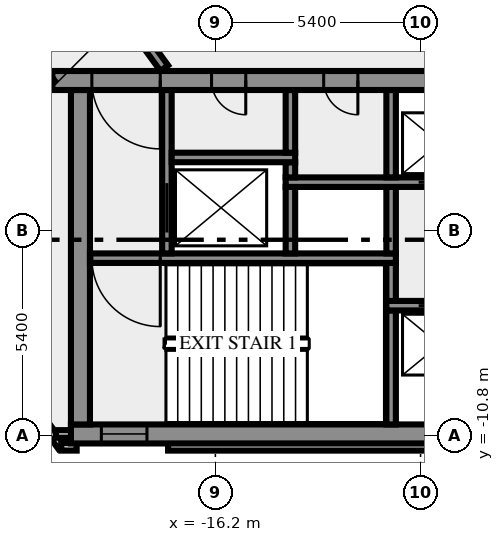
"""IFC4 building model, lengths in metres.
Left out: names, types, materials, properties, quantities, classifications, styles, units other than length and angle.
Written with IfcOpenShell. Run it as: python <this file> out.ifc"""

import sys

from ifc_helpers import new_model, si_unit, direction, frame, frame_2d, origin, place, context, subcontext, project, spatial, rectangle, extrude, element, fill, save


model = new_model("IFC4")
c1 = context("Model", 3, precision=1e-05, world=origin(), true_north=direction((0.0, 1.0)))
c2 = subcontext(c1, "Body", "Model", "MODEL_VIEW")
j1 = project(units=[si_unit("LENGTHUNIT", "METRE"), si_unit("PLANEANGLEUNIT", "RADIAN")], contexts=[c1])
p1 = place(None, origin())
s1 = spatial("IfcSite", under=j1, at=p1, CompositionType="ELEMENT")
p2 = place(p1, origin())
s2 = spatial("IfcBuilding", under=s1, at=p2, CompositionType="ELEMENT")
p3 = place(p2, frame((0.0, 0.0, 43.0)))
s3 = spatial("IfcBuildingStorey", under=s2, at=p3, CompositionType="ELEMENT", Elevation=43.0)
p4 = place(p3, frame((-21.833, -8.909, 0.0), z_axis=(0.0, 0.0, 1.0), x_axis=(0.587766567315, -0.809030569476, 0.0)))
e1 = element("IfcWall", 1, at=p4, inside=s3, PredefinedType="SOLIDWALL", context=c2, shape_type="SweptSolid", body=[
    extrude(rectangle(XDim=2.688, YDim=0.2, at=frame_2d((1.344, 0.0))), origin(), (0.0, 0.0, 1.0), 3.65),
])
p5 = place(p3, frame((-20.256, -11.088, 0.0), z_axis=(0.0, 0.0, 1.0), x_axis=(1.0, 0.0, 0.0)))
e2 = element("IfcWall", 2, at=p5, inside=s3, PredefinedType="SOLIDWALL", context=c2, shape_type="SweptSolid", body=[
    extrude(rectangle(XDim=0.406, YDim=0.2, at=frame_2d((0.203, 0.0))), origin(), (0.0, 0.0, 1.0), 3.65),
])
p6 = place(p3, frame((-17.444, -11.088, 0.0), z_axis=(0.0, 0.0, 1.0), x_axis=(1.0, 0.0, 0.0)))
e3 = element("IfcWall", 3, at=p6, inside=s3, PredefinedType="SOLIDWALL", context=c2, shape_type="SweptSolid", body=[
    extrude(rectangle(XDim=34.888, YDim=0.2, at=frame_2d((17.444, 0.0))), origin(), (0.0, 0.0, 1.0), 3.65),
])
p7 = place(p3, frame((-19.98, -10.75, 0.0), z_axis=(0.0, 0.0, 1.0), x_axis=(-1.0, 0.0, 0.0)))
e4 = element("IfcWall", 4, at=p7, inside=s3, PredefinedType="SOLIDWALL", context=c2, shape_type="SweptSolid", body=[
    extrude(rectangle(XDim=0.417, YDim=0.2, at=frame_2d((0.208, 0.0))), origin(), (0.0, 0.0, 1.0), 3.65),
])
p8 = place(p3, frame((-20.0, -10.75, 0.0), z_axis=(0.0, 0.0, 1.0), x_axis=(1.0, 0.0, 0.0)))
e5 = element("IfcWall", 5, at=p8, inside=s3, PredefinedType="SHEAR", context=c2, shape_type="SweptSolid", body=[
    extrude(rectangle(XDim=40.0, YDim=0.5, at=frame_2d((20.0, 0.0))), origin(), (0.0, 0.0, 1.0), 3.65),
])
p9 = place(p8, frame((0.8, 0.0, 1.0)))
e6 = element("IfcOpeningElement", 6, at=p9, cuts=e5, PredefinedType="OPENING", context=c2, shape_type="SweptSolid", body=[
    extrude(rectangle(XDim=1.2, YDim=1.2, at=frame_2d((0.6, 0.6))), frame((0.0, 0.26, 0.0), z_axis=(0.0, -1.0, 0.0), x_axis=(1.0, 0.0, 0.0)), (0.0, 0.0, 1.0), 0.52),
])
p10 = place(p8, frame((38.0, 0.0, 1.0)))
e7 = element("IfcOpeningElement", 7, at=p10, cuts=e5, PredefinedType="OPENING", context=c2, shape_type="SweptSolid", body=[
    extrude(rectangle(XDim=1.2, YDim=1.2, at=frame_2d((0.6, 0.6))), frame((0.0, 0.26, 0.0), z_axis=(0.0, -1.0, 0.0), x_axis=(1.0, 0.0, 0.0)), (0.0, 0.0, 1.0), 0.52),
])
p11 = place(p3, frame((-19.75, -10.5, 0.0), z_axis=(0.0, 0.0, 1.0), x_axis=(0.0, 1.0, 0.0)))
e8 = element("IfcWall", 8, at=p11, inside=s3, PredefinedType="SHEAR", context=c2, shape_type="SweptSolid", body=[
    extrude(rectangle(XDim=8.8, YDim=0.5, at=frame_2d((4.4, 0.0))), origin(), (0.0, 0.0, 1.0), 3.65),
])
p12 = place(p3, frame((-11.575, -10.5, 0.0), z_axis=(0.0, 0.0, 1.0), x_axis=(0.0, 1.0, 0.0)))
e9 = element("IfcWall", 9, at=p12, inside=s3, PredefinedType="SHEAR", context=c2, shape_type="SweptSolid", body=[
    extrude(rectangle(XDim=3.0, YDim=0.25, at=frame_2d((1.5, 0.0))), origin(), (0.0, 0.0, 1.0), 3.65),
])
p13 = place(p3, frame((11.7, -7.375, 0.0), z_axis=(0.0, 0.0, 1.0), x_axis=(-1.0, 0.0, 0.0)))
e10 = element("IfcWall", 10, at=p13, inside=s3, PredefinedType="SHEAR", context=c2, shape_type="SweptSolid", body=[
    extrude(rectangle(XDim=23.4, YDim=0.25, at=frame_2d((11.7, 0.0))), origin(), (0.0, 0.0, 1.0), 3.65),
])
p14 = place(p13, frame((21.45, 0.0, 0.0)))
e11 = element("IfcOpeningElement", 11, at=p14, cuts=e10, PredefinedType="OPENING", context=c2, shape_type="SweptSolid", body=[
    extrude(rectangle(XDim=1.1, YDim=2.1, at=frame_2d((0.55, 1.05))), frame((0.0, 0.135, 0.0), z_axis=(0.0, -1.0, 0.0), x_axis=(1.0, 0.0, 0.0)), (0.0, 0.0, 1.0), 0.27),
])
p15 = place(p13, frame((18.95, 0.0, 0.0)))
e12 = element("IfcOpeningElement", 12, at=p15, cuts=e10, PredefinedType="OPENING", context=c2, shape_type="SweptSolid", body=[
    extrude(rectangle(XDim=1.1, YDim=2.1, at=frame_2d((0.55, 1.05))), frame((0.0, 0.135, 0.0), z_axis=(0.0, -1.0, 0.0), x_axis=(1.0, 0.0, 0.0)), (0.0, 0.0, 1.0), 0.27),
])
p16 = place(p13, frame((16.45, 0.0, 0.0)))
e13 = element("IfcOpeningElement", 13, at=p16, cuts=e10, PredefinedType="OPENING", context=c2, shape_type="SweptSolid", body=[
    extrude(rectangle(XDim=1.1, YDim=2.1, at=frame_2d((0.55, 1.05))), frame((0.0, 0.135, 0.0), z_axis=(0.0, -1.0, 0.0), x_axis=(1.0, 0.0, 0.0)), (0.0, 0.0, 1.0), 0.27),
])
p17 = place(p13, frame((13.875, 0.0, 0.0)))
e14 = element("IfcOpeningElement", 14, at=p17, cuts=e10, PredefinedType="OPENING", context=c2, shape_type="SweptSolid", body=[
    extrude(rectangle(XDim=0.9, YDim=2.1, at=frame_2d((0.45, 1.05))), frame((0.0, 0.135, 0.0), z_axis=(0.0, -1.0, 0.0), x_axis=(1.0, 0.0, 0.0)), (0.0, 0.0, 1.0), 0.27),
])
p18 = place(p13, frame((11.1, 0.0, 0.0)))
e15 = element("IfcOpeningElement", 15, at=p18, cuts=e10, PredefinedType="OPENING", context=c2, shape_type="SweptSolid", body=[
    extrude(rectangle(XDim=0.9, YDim=2.1, at=frame_2d((0.45, 1.05))), frame((0.0, 0.135, 0.0), z_axis=(0.0, -1.0, 0.0), x_axis=(1.0, 0.0, 0.0)), (0.0, 0.0, 1.0), 0.27),
])
p19 = place(p3, frame((-11.575, -7.25, 0.0), z_axis=(0.0, 0.0, 1.0), x_axis=(0.0, 1.0, 0.0)))
e16 = element("IfcWall", 16, at=p19, inside=s3, PredefinedType="SHEAR", context=c2, shape_type="SweptSolid", body=[
    extrude(rectangle(XDim=1.0, YDim=0.25, at=frame_2d((0.5, 0.0))), origin(), (0.0, 0.0, 1.0), 3.65),
])
p20 = place(p3, frame((-11.45, -6.125, 0.0), z_axis=(0.0, 0.0, 1.0), x_axis=(-1.0, 0.0, 0.0)))
e17 = element("IfcWall", 17, at=p20, inside=s3, PredefinedType="SHEAR", context=c2, shape_type="SweptSolid", body=[
    extrude(rectangle(XDim=8.05, YDim=0.25, at=frame_2d((4.025, 0.0))), origin(), (0.0, 0.0, 1.0), 3.65),
])
p21 = place(p20, frame((6.2, 0.0, 0.0)))
e18 = element("IfcOpeningElement", 18, at=p21, cuts=e17, PredefinedType="OPENING", context=c2, shape_type="SweptSolid", body=[
    extrude(rectangle(XDim=1.8, YDim=2.1, at=frame_2d((0.9, 1.05))), frame((0.0, 0.135, 0.0), z_axis=(0.0, -1.0, 0.0), x_axis=(1.0, 0.0, 0.0)), (0.0, 0.0, 1.0), 0.27),
])
p22 = place(p3, frame((-17.475, -6.0, 0.0), z_axis=(0.0, 0.0, 1.0), x_axis=(0.0, 1.0, 0.0)))
e19 = element("IfcWall", 19, at=p22, inside=s3, PredefinedType="SHEAR", context=c2, shape_type="SweptSolid", body=[
    extrude(rectangle(XDim=4.3, YDim=0.25, at=frame_2d((2.15, 0.0))), origin(), (0.0, 0.0, 1.0), 3.65),
])
p23 = place(p22, frame((0.55, 0.0, 0.0)))
e20 = element("IfcOpeningElement", 20, at=p23, cuts=e19, PredefinedType="OPENING", context=c2, shape_type="SweptSolid", body=[
    extrude(rectangle(XDim=1.3, YDim=2.1, at=frame_2d((0.65, 1.05))), frame((0.0, 0.135, 0.0), z_axis=(0.0, -1.0, 0.0), x_axis=(1.0, 0.0, 0.0)), (0.0, 0.0, 1.0), 0.27),
])
for number, where, z_axis, x_axis in (
    (21, (-14.225, -6.0, 0.0), (0.0, 0.0, 1.0), (0.0, 1.0, 0.0)),
    (22, (-11.575, -6.0, 0.0), (0.0, 0.0, 1.0), (0.0, 1.0, 0.0)),
):
    element("IfcWall", number, at=place(p3, frame(where, z_axis=z_axis, x_axis=x_axis)), inside=s3, PredefinedType="SHEAR", context=c2, shape_type="SweptSolid", body=[
        extrude(rectangle(XDim=1.75, YDim=0.25, at=frame_2d((0.875, 0.0))), origin(), (0.0, 0.0, 1.0), 3.65),
    ])
p24 = place(p3, frame((-14.35, -4.125, 0.0), z_axis=(0.0, 0.0, 1.0), x_axis=(1.0, 0.0, 0.0)))
e23 = element("IfcWall", 23, at=p24, inside=s3, PredefinedType="SHEAR", context=c2, shape_type="SweptSolid", body=[
    extrude(rectangle(XDim=12.7, YDim=0.25, at=frame_2d((6.35, 0.0))), origin(), (0.0, 0.0, 1.0), 3.65),
])
p25 = place(p24, frame((3.5, 0.0, 0.0)))
e24 = element("IfcOpeningElement", 24, at=p25, cuts=e23, PredefinedType="OPENING", context=c2, shape_type="SweptSolid", body=[
    extrude(rectangle(XDim=1.1, YDim=2.1, at=frame_2d((0.55, 1.05))), frame((0.0, 0.135, 0.0), z_axis=(0.0, -1.0, 0.0), x_axis=(1.0, 0.0, 0.0)), (0.0, 0.0, 1.0), 0.27),
])
p26 = place(p24, frame((6.0, 0.0, 0.0)))
e25 = element("IfcOpeningElement", 25, at=p26, cuts=e23, PredefinedType="OPENING", context=c2, shape_type="SweptSolid", body=[
    extrude(rectangle(XDim=1.1, YDim=2.1, at=frame_2d((0.55, 1.05))), frame((0.0, 0.135, 0.0), z_axis=(0.0, -1.0, 0.0), x_axis=(1.0, 0.0, 0.0)), (0.0, 0.0, 1.0), 0.27),
])
p27 = place(p24, frame((8.5, 0.0, 0.0)))
e26 = element("IfcOpeningElement", 26, at=p27, cuts=e23, PredefinedType="OPENING", context=c2, shape_type="SweptSolid", body=[
    extrude(rectangle(XDim=1.1, YDim=2.1, at=frame_2d((0.55, 1.05))), frame((0.0, 0.135, 0.0), z_axis=(0.0, -1.0, 0.0), x_axis=(1.0, 0.0, 0.0)), (0.0, 0.0, 1.0), 0.27),
])
p28 = place(p3, frame((-14.225, -4.0, 0.0), z_axis=(0.0, 0.0, 1.0), x_axis=(0.0, 1.0, 0.0)))
e27 = element("IfcWall", 27, at=p28, inside=s3, PredefinedType="SHEAR", context=c2, shape_type="SweptSolid", body=[
    extrude(rectangle(XDim=0.4, YDim=0.25, at=frame_2d((0.2, 0.0))), origin(), (0.0, 0.0, 1.0), 3.65),
])
p29 = place(p3, frame((-11.575, -4.0, 0.0), z_axis=(0.0, 0.0, 1.0), x_axis=(0.0, 1.0, 0.0)))
e28 = element("IfcWall", 28, at=p29, inside=s3, PredefinedType="SHEAR", context=c2, shape_type="SweptSolid", body=[
    extrude(rectangle(XDim=2.3, YDim=0.25, at=frame_2d((1.15, 0.0))), origin(), (0.0, 0.0, 1.0), 3.65),
])
p30 = place(p3, frame((-17.35, -3.475, 0.0), z_axis=(0.0, 0.0, 1.0), x_axis=(1.0, 0.0, 0.0)))
e29 = element("IfcWall", 29, at=p30, inside=s3, PredefinedType="SHEAR", context=c2, shape_type="SweptSolid", body=[
    extrude(rectangle(XDim=3.25, YDim=0.25, at=frame_2d((1.625, 0.0))), origin(), (0.0, 0.0, 1.0), 3.65),
])
p31 = place(p3, frame((-14.225, -3.35, 0.0), z_axis=(0.0, 0.0, 1.0), x_axis=(0.0, 1.0, 0.0)))
e30 = element("IfcWall", 30, at=p31, inside=s3, PredefinedType="SHEAR", context=c2, shape_type="SweptSolid", body=[
    extrude(rectangle(XDim=1.65, YDim=0.25, at=frame_2d((0.825, 0.0))), origin(), (0.0, 0.0, 1.0), 3.65),
])
p32 = place(p3, frame((20.49, -1.45, 0.0), z_axis=(0.0, 0.0, 1.0), x_axis=(-1.0, 0.0, 0.0)))
e31 = element("IfcWall", 31, at=p32, inside=s3, PredefinedType="SHEAR", context=c2, shape_type="SweptSolid", body=[
    extrude(rectangle(XDim=40.98, YDim=0.5, at=frame_2d((20.49, 0.0))), origin(), (0.0, 0.0, 1.0), 3.65),
])
p33 = place(p32, frame((38.14, 0.0, 0.0)))
e32 = element("IfcOpeningElement", 32, at=p33, cuts=e31, PredefinedType="OPENING", context=c2, shape_type="SweptSolid", body=[
    extrude(rectangle(XDim=1.8, YDim=2.1, at=frame_2d((0.9, 1.05))), frame((0.0, 0.26, 0.0), z_axis=(0.0, -1.0, 0.0), x_axis=(1.0, 0.0, 0.0)), (0.0, 0.0, 1.0), 0.52),
])
p34 = place(p32, frame((35.89, 0.0, 0.0)))
e33 = element("IfcOpeningElement", 33, at=p34, cuts=e31, PredefinedType="OPENING", context=c2, shape_type="SweptSolid", body=[
    extrude(rectangle(XDim=0.9, YDim=2.1, at=frame_2d((0.45, 1.05))), frame((0.0, 0.26, 0.0), z_axis=(0.0, -1.0, 0.0), x_axis=(1.0, 0.0, 0.0)), (0.0, 0.0, 1.0), 0.52),
])
p35 = place(p32, frame((32.94, 0.0, 0.0)))
e34 = element("IfcOpeningElement", 34, at=p35, cuts=e31, PredefinedType="OPENING", context=c2, shape_type="SweptSolid", body=[
    extrude(rectangle(XDim=0.9, YDim=2.1, at=frame_2d((0.45, 1.05))), frame((0.0, 0.26, 0.0), z_axis=(0.0, -1.0, 0.0), x_axis=(1.0, 0.0, 0.0)), (0.0, 0.0, 1.0), 0.52),
])
p36 = place(p32, frame((19.59, 0.0, 0.0)))
e35 = element("IfcOpeningElement", 35, at=p36, cuts=e31, PredefinedType="OPENING", context=c2, shape_type="SweptSolid", body=[
    extrude(rectangle(XDim=2.0, YDim=2.1, at=frame_2d((1.0, 1.05))), frame((0.0, 0.26, 0.0), z_axis=(0.0, -1.0, 0.0), x_axis=(1.0, 0.0, 0.0)), (0.0, 0.0, 1.0), 0.52),
])
p37 = place(p32, frame((7.14, 0.0, 0.0)))
e36 = element("IfcOpeningElement", 36, at=p37, cuts=e31, PredefinedType="OPENING", context=c2, shape_type="SweptSolid", body=[
    extrude(rectangle(XDim=0.9, YDim=2.1, at=frame_2d((0.45, 1.05))), frame((0.0, 0.26, 0.0), z_axis=(0.0, -1.0, 0.0), x_axis=(1.0, 0.0, 0.0)), (0.0, 0.0, 1.0), 0.52),
])
p38 = place(p32, frame((5.028, 0.0, 0.0)))
e37 = element("IfcOpeningElement", 37, at=p38, cuts=e31, PredefinedType="OPENING", context=c2, shape_type="SweptSolid", body=[
    extrude(rectangle(XDim=0.8, YDim=2.1, at=frame_2d((0.4, 1.05))), frame((0.0, 0.26, 0.0), z_axis=(0.0, -1.0, 0.0), x_axis=(1.0, 0.0, 0.0)), (0.0, 0.0, 1.0), 0.52),
])
p39 = place(p32, frame((3.452, 0.0, 0.0)))
e38 = element("IfcOpeningElement", 38, at=p39, cuts=e31, PredefinedType="OPENING", context=c2, shape_type="SweptSolid", body=[
    extrude(rectangle(XDim=0.8, YDim=2.1, at=frame_2d((0.4, 1.05))), frame((0.0, 0.26, 0.0), z_axis=(0.0, -1.0, 0.0), x_axis=(1.0, 0.0, 0.0)), (0.0, 0.0, 1.0), 0.52),
])
p40 = place(p32, frame((1.04, 0.0, 0.0)))
e39 = element("IfcOpeningElement", 39, at=p40, cuts=e31, PredefinedType="OPENING", context=c2, shape_type="SweptSolid", body=[
    extrude(rectangle(XDim=1.8, YDim=2.1, at=frame_2d((0.9, 1.05))), frame((0.0, 0.26, 0.0), z_axis=(0.0, -1.0, 0.0), x_axis=(1.0, 0.0, 0.0)), (0.0, 0.0, 1.0), 0.52),
])
p41 = place(p3, frame((-20.531, -1.523, 0.0), z_axis=(0.0, 0.0, 1.0), x_axis=(-0.587784593204, 0.809017473231, 0.0)))
e40 = element("IfcWall", 40, at=p41, inside=s3, PredefinedType="SOLIDWALL", context=c2, shape_type="SweptSolid", body=[
    extrude(rectangle(XDim=44.67, YDim=0.25, at=frame_2d((22.335, 0.0))), origin(), (0.0, 0.0, 1.0), 3.65),
])
p42 = place(p41, frame((26.14, 0.0, 0.0)))
e41 = element("IfcOpeningElement", 41, at=p42, cuts=e40, PredefinedType="OPENING", context=c2, shape_type="SweptSolid", body=[
    extrude(rectangle(XDim=1.8, YDim=2.1, at=frame_2d((0.9, 1.05))), frame((0.0, 0.135, 0.0), z_axis=(0.0, -1.0, 0.0), x_axis=(1.0, 0.0, 0.0)), (0.0, 0.0, 1.0), 0.27),
])
p43 = place(p41, frame((43.296, 0.0, 0.0)))
e42 = element("IfcOpeningElement", 42, at=p43, cuts=e40, PredefinedType="OPENING", context=c2, shape_type="SweptSolid", body=[
    extrude(rectangle(XDim=0.9, YDim=2.1, at=frame_2d((0.45, 1.05))), frame((0.0, 0.135, 0.0), z_axis=(0.0, -1.0, 0.0), x_axis=(1.0, 0.0, 0.0)), (0.0, 0.0, 1.0), 0.27),
])
p44 = place(p41, frame((13.216, 0.0, 0.0)))
e43 = element("IfcOpeningElement", 43, at=p44, cuts=e40, PredefinedType="OPENING", context=c2, shape_type="SweptSolid", body=[
    extrude(rectangle(XDim=0.9, YDim=2.1, at=frame_2d((0.45, 1.05))), frame((0.0, 0.135, 0.0), z_axis=(0.0, -1.0, 0.0), x_axis=(1.0, 0.0, 0.0)), (0.0, 0.0, 1.0), 0.27),
])
p45 = place(p41, frame((7.816, 0.0, 0.0)))
e44 = element("IfcOpeningElement", 44, at=p45, cuts=e40, PredefinedType="OPENING", context=c2, shape_type="SweptSolid", body=[
    extrude(rectangle(XDim=0.9, YDim=2.1, at=frame_2d((0.45, 1.05))), frame((0.0, 0.135, 0.0), z_axis=(0.0, -1.0, 0.0), x_axis=(1.0, 0.0, 0.0)), (0.0, 0.0, 1.0), 0.27),
])
p46 = place(p41, frame((0.533, 0.0, 0.0)))
e45 = element("IfcOpeningElement", 45, at=p46, cuts=e40, PredefinedType="OPENING", context=c2, shape_type="SweptSolid", body=[
    extrude(rectangle(XDim=0.9, YDim=2.1, at=frame_2d((0.45, 1.05))), frame((0.0, 0.135, 0.0), z_axis=(0.0, -1.0, 0.0), x_axis=(1.0, 0.0, 0.0)), (0.0, 0.0, 1.0), 0.27),
])
p47 = place(p3, frame((-37.232, 25.972, 0.0), z_axis=(0.0, 0.0, 1.0), x_axis=(0.587786323093, -0.809016216391, 0.0)))
e46 = element("IfcWall", 46, at=p47, inside=s3, PredefinedType="SOLIDWALL", context=c2, shape_type="SweptSolid", body=[
    extrude(rectangle(XDim=33.493, YDim=0.25, at=frame_2d((16.747, 0.0))), origin(), (0.0, 0.0, 1.0), 3.65),
])
p48 = place(p47, frame((2.935, 0.0, 0.0)))
e47 = element("IfcOpeningElement", 47, at=p48, cuts=e46, PredefinedType="OPENING", context=c2, shape_type="SweptSolid", body=[
    extrude(rectangle(XDim=0.9, YDim=2.1, at=frame_2d((0.45, 1.05))), frame((0.0, 0.135, 0.0), z_axis=(0.0, -1.0, 0.0), x_axis=(1.0, 0.0, 0.0)), (0.0, 0.0, 1.0), 0.27),
])
p49 = place(p47, frame((16.435, 0.0, 0.0)))
e48 = element("IfcOpeningElement", 48, at=p49, cuts=e46, PredefinedType="OPENING", context=c2, shape_type="SweptSolid", body=[
    extrude(rectangle(XDim=0.9, YDim=2.1, at=frame_2d((0.45, 1.05))), frame((0.0, 0.135, 0.0), z_axis=(0.0, -1.0, 0.0), x_axis=(1.0, 0.0, 0.0)), (0.0, 0.0, 1.0), 0.27),
])
p50 = place(p47, frame((29.152, 0.0, 0.0)))
e49 = element("IfcOpeningElement", 49, at=p50, cuts=e46, PredefinedType="OPENING", context=c2, shape_type="SweptSolid", body=[
    extrude(rectangle(XDim=0.9, YDim=2.1, at=frame_2d((0.45, 1.05))), frame((0.0, 0.135, 0.0), z_axis=(0.0, -1.0, 0.0), x_axis=(1.0, 0.0, 0.0)), (0.0, 0.0, 1.0), 0.27),
])
p51 = place(p47, frame((14.536, 0.0, 0.0)))
e50 = element("IfcOpeningElement", 50, at=p51, cuts=e46, PredefinedType="OPENING", context=c2, shape_type="SweptSolid", body=[
    extrude(rectangle(XDim=1.2, YDim=2.1, at=frame_2d((0.6, 1.05))), frame((0.0, 0.135, 0.0), z_axis=(0.0, -1.0, 0.0), x_axis=(1.0, 0.0, 0.0)), (0.0, 0.0, 1.0), 0.27),
])
p52 = place(p47, frame((1.335, 0.0, 0.0)))
e51 = element("IfcOpeningElement", 51, at=p52, cuts=e46, PredefinedType="OPENING", context=c2, shape_type="SweptSolid", body=[
    extrude(rectangle(XDim=0.9, YDim=2.1, at=frame_2d((0.45, 1.05))), frame((0.0, 0.135, 0.0), z_axis=(0.0, -1.0, 0.0), x_axis=(1.0, 0.0, 0.0)), (0.0, 0.0, 1.0), 0.27),
])
p53 = place(p9, origin())
e52 = element("IfcWindow", 52, at=p53, inside=s3, PartitioningType="SINGLE_PANEL", PredefinedType="WINDOW", context=c2, shape_type="SweptSolid", body=[
    extrude(rectangle(XDim=1.2, YDim=1.2, at=frame_2d((0.6, 0.6))), frame((0.0, 0.03, 0.0), z_axis=(0.0, -1.0, 0.0), x_axis=(1.0, 0.0, 0.0)), (0.0, 0.0, 1.0), 0.06),
])
fill(e6, e52)
p54 = place(p14, origin())
e53 = element("IfcDoor", 53, at=p54, inside=s3, OperationType="DOUBLE_DOOR_SLIDING", PredefinedType="DOOR", context=c2, shape_type="SweptSolid", body=[
    extrude(rectangle(XDim=1.1, YDim=2.1, at=frame_2d((0.55, 1.05))), frame((0.0, 0.025, 0.0), z_axis=(0.0, -1.0, 0.0), x_axis=(1.0, 0.0, 0.0)), (0.0, 0.0, 1.0), 0.05),
])
fill(e11, e53)
p55 = place(p21, origin())
e54 = element("IfcDoor", 54, at=p55, inside=s3, OperationType="DOUBLE_DOOR_SINGLE_SWING", PredefinedType="DOOR", context=c2, shape_type="SweptSolid", body=[
    extrude(rectangle(XDim=1.8, YDim=2.1, at=frame_2d((0.9, 1.05))), frame((0.0, 0.025, 0.0), z_axis=(0.0, -1.0, 0.0), x_axis=(1.0, 0.0, 0.0)), (0.0, 0.0, 1.0), 0.05),
])
fill(e18, e54)
p56 = place(p23, origin())
e55 = element("IfcDoor", 55, at=p56, inside=s3, OperationType="DOUBLE_DOOR_SLIDING", PredefinedType="DOOR", context=c2, shape_type="SweptSolid", body=[
    extrude(rectangle(XDim=1.3, YDim=2.1, at=frame_2d((0.65, 1.05))), frame((0.0, 0.025, 0.0), z_axis=(0.0, -1.0, 0.0), x_axis=(1.0, 0.0, 0.0)), (0.0, 0.0, 1.0), 0.05),
])
fill(e20, e55)
p57 = place(p25, origin())
e56 = element("IfcDoor", 56, at=p57, inside=s3, OperationType="DOUBLE_DOOR_SLIDING", PredefinedType="DOOR", context=c2, shape_type="SweptSolid", body=[
    extrude(rectangle(XDim=1.1, YDim=2.1, at=frame_2d((0.55, 1.05))), frame((0.0, 0.025, 0.0), z_axis=(0.0, -1.0, 0.0), x_axis=(1.0, 0.0, 0.0)), (0.0, 0.0, 1.0), 0.05),
])
fill(e24, e56)
p58 = place(p33, origin())
e57 = element("IfcDoor", 57, at=p58, inside=s3, OperationType="DOUBLE_DOOR_SINGLE_SWING", PredefinedType="DOOR", context=c2, shape_type="SweptSolid", body=[
    extrude(rectangle(XDim=1.8, YDim=2.1, at=frame_2d((0.9, 1.05))), frame((0.0, 0.025, 0.0), z_axis=(0.0, -1.0, 0.0), x_axis=(1.0, 0.0, 0.0)), (0.0, 0.0, 1.0), 0.05),
])
fill(e32, e57)
p59 = place(p34, origin())
e58 = element("IfcDoor", 58, at=p59, inside=s3, OperationType="SINGLE_SWING_RIGHT", PredefinedType="DOOR", context=c2, shape_type="SweptSolid", body=[
    extrude(rectangle(XDim=0.9, YDim=2.1, at=frame_2d((0.45, 1.05))), frame((0.0, 0.025, 0.0), z_axis=(0.0, -1.0, 0.0), x_axis=(1.0, 0.0, 0.0)), (0.0, 0.0, 1.0), 0.05),
])
fill(e33, e58)
p60 = place(p35, origin())
e59 = element("IfcDoor", 59, at=p60, inside=s3, OperationType="SINGLE_SWING_RIGHT", PredefinedType="DOOR", context=c2, shape_type="SweptSolid", body=[
    extrude(rectangle(XDim=0.9, YDim=2.1, at=frame_2d((0.45, 1.05))), frame((0.0, 0.025, 0.0), z_axis=(0.0, -1.0, 0.0), x_axis=(1.0, 0.0, 0.0)), (0.0, 0.0, 1.0), 0.05),
])
fill(e34, e59)
save(model, sys.argv[1])
